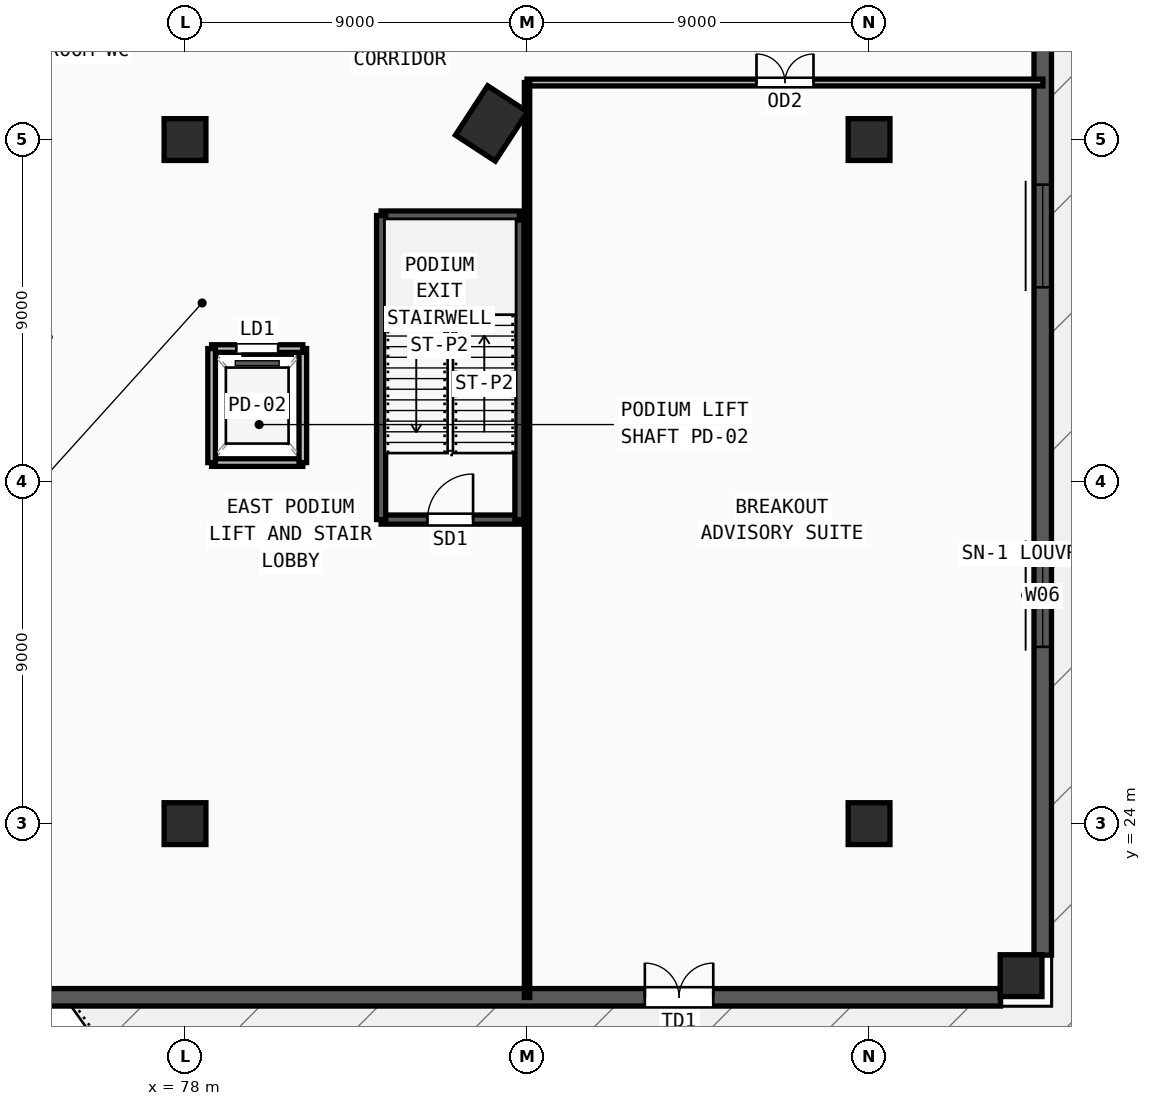
"""IFC4 building model, lengths in metres.
Left out: names, types, materials, properties, quantities, classifications, styles, units other than length and angle.
Written with IfcOpenShell. Run it as: python <this file> out.ifc"""

import sys

from ifc_helpers import new_model, si_unit, direction, frame, frame_2d, origin, origin_2d, place, context, subcontext, project, spatial, rectangle, extrude, source, transform, mapped, element, fill, save


model = new_model("IFC4")
c1 = context("Model", 3, precision=1e-05, world=origin(), true_north=direction((0.0, 1.0)))
c2 = subcontext(c1, "Body", "Model", "MODEL_VIEW")
j1 = project(units=[si_unit("LENGTHUNIT", "METRE"), si_unit("PLANEANGLEUNIT", "RADIAN")], contexts=[c1])
p1 = place(None, origin())
s1 = spatial("IfcSite", under=j1, at=p1, CompositionType="ELEMENT")
p2 = place(p1, origin())
s2 = spatial("IfcBuilding", under=s1, at=p2, CompositionType="ELEMENT")
p3 = place(p2, frame((0.0, 0.0, 9.9)))
s3 = spatial("IfcBuildingStorey", under=s2, at=p3, CompositionType="ELEMENT", Elevation=9.9)
m1 = source(origin(), c2, "Body", "SweptSolid", [
    extrude(rectangle(XDim=1.55, YDim=1.25, at=origin_2d()), origin(), (0.0, 0.0, 1.0), 4.5),
])
p4 = place(p3, frame((86.064, 42.423, 0.0), z_axis=(0.0, 0.0, 1.0), x_axis=(0.546978918409, 0.837146380758, 0.0)))
e1 = element("IfcColumn", 1, at=p4, inside=s3, PredefinedType="COLUMN", context=c2, shape_type="MappedRepresentation", body=[
    mapped(m1, transform((0.0, 0.0, 0.0), x_axis=(1.0, 0.0, 0.0), y_axis=(0.0, 1.0, 0.0), z_axis=(0.0, 0.0, 1.0), scale=1.0)),
])
m2 = source(origin(), c2, "Body", "SweptSolid", [
    extrude(rectangle(XDim=1.1, YDim=1.1, at=origin_2d()), origin(), (0.0, 0.0, 1.0), 4.5),
])
for number, where, z_axis, x_axis in (
    (2, (78.0, 24.0, 0.0), (0.0, 0.0, 1.0), (1.0, 0.0, 0.0)),
    (3, (96.0, 24.0, 0.0), (0.0, 0.0, 1.0), (1.0, 0.0, 0.0)),
    (4, (78.0, 42.0, 0.0), (0.0, 0.0, 1.0), (1.0, 0.0, 0.0)),
    (5, (96.0, 42.0, 0.0), (0.0, 0.0, 1.0), (1.0, 0.0, 0.0)),
    (6, (100.0, 20.0, 0.0), (0.0, 0.0, 1.0), (1.0, 0.0, 0.0)),
):
    element("IfcColumn", number, at=place(p3, frame(where, z_axis=z_axis, x_axis=x_axis)), inside=s3, PredefinedType="COLUMN", context=c2, shape_type="MappedRepresentation", body=[
        mapped(m2, transform((0.0, 0.0, 0.0), x_axis=(1.0, 0.0, 0.0), y_axis=(0.0, 1.0, 0.0), z_axis=(0.0, 0.0, 1.0), scale=1.0)),
    ])
p5 = place(p3, frame((100.57, 20.54, 0.0), z_axis=(0.0, 0.0, 1.0), x_axis=(0.0, 1.0, 0.0)))
e7 = element("IfcWall", 7, at=p5, inside=s3, PredefinedType="SOLIDWALL", context=c2, shape_type="SweptSolid", body=[
    extrude(rectangle(XDim=66.23, YDim=0.46, at=frame_2d((33.115, 0.0))), origin(), (0.0, 0.0, 1.0), 4.25),
])
m3 = source(origin(), c2, "Body", "SweptSolid", [
    extrude(rectangle(XDim=2.7, YDim=2.35, at=frame_2d((1.35, 1.175))), frame((0.0, 0.24, 0.0), z_axis=(0.0, -1.0, 0.0), x_axis=(1.0, 0.0, 0.0)), (0.0, 0.0, 1.0), 0.48),
])
p6 = place(p5, frame((8.111, 0.0, 0.55)))
e8 = element("IfcOpeningElement", 8, at=p6, cuts=e7, PredefinedType="OPENING", context=c2, shape_type="MappedRepresentation", body=[
    mapped(m3, transform((0.0, 0.0, 0.0), x_axis=(1.0, 0.0, 0.0), y_axis=(0.0, 1.0, 0.0), z_axis=(0.0, 0.0, 1.0), scale=1.0)),
])
p7 = place(p5, frame((17.573, 0.0, 0.55)))
e9 = element("IfcOpeningElement", 9, at=p7, cuts=e7, PredefinedType="OPENING", context=c2, shape_type="MappedRepresentation", body=[
    mapped(m3, transform((0.0, 0.0, 0.0), x_axis=(1.0, 0.0, 0.0), y_axis=(0.0, 1.0, 0.0), z_axis=(0.0, 0.0, 1.0), scale=1.0)),
])
p8 = place(p5, frame((27.034, 0.0, 0.55)))
e10 = element("IfcOpeningElement", 10, at=p8, cuts=e7, PredefinedType="OPENING", context=c2, shape_type="MappedRepresentation", body=[
    mapped(m3, transform((0.0, 0.0, 0.0), x_axis=(1.0, 0.0, 0.0), y_axis=(0.0, 1.0, 0.0), z_axis=(0.0, 0.0, 1.0), scale=1.0)),
])
p9 = place(p5, frame((36.496, 0.0, 0.55)))
e11 = element("IfcOpeningElement", 11, at=p9, cuts=e7, PredefinedType="OPENING", context=c2, shape_type="MappedRepresentation", body=[
    mapped(m3, transform((0.0, 0.0, 0.0), x_axis=(1.0, 0.0, 0.0), y_axis=(0.0, 1.0, 0.0), z_axis=(0.0, 0.0, 1.0), scale=1.0)),
])
p10 = place(p5, frame((55.419, 0.0, 0.55)))
e12 = element("IfcOpeningElement", 12, at=p10, cuts=e7, PredefinedType="OPENING", context=c2, shape_type="MappedRepresentation", body=[
    mapped(m3, transform((0.0, 0.0, 0.0), x_axis=(1.0, 0.0, 0.0), y_axis=(0.0, 1.0, 0.0), z_axis=(0.0, 0.0, 1.0), scale=1.0)),
])
p11 = place(p3, frame((20.54, 19.43, 0.0), z_axis=(0.0, 0.0, 1.0), x_axis=(1.0, 0.0, 0.0)))
e13 = element("IfcWall", 13, at=p11, inside=s3, PredefinedType="SOLIDWALL", context=c2, shape_type="SweptSolid", body=[
    extrude(rectangle(XDim=78.92, YDim=0.46, at=frame_2d((39.46, 0.0))), origin(), (0.0, 0.0, 1.0), 4.25),
])
m4 = source(origin(), c2, "Body", "SweptSolid", [
    extrude(rectangle(XDim=1.8, YDim=2.3, at=frame_2d((0.9, 1.15))), frame((0.0, 0.24, 0.0), z_axis=(0.0, -1.0, 0.0), x_axis=(1.0, 0.0, 0.0)), (0.0, 0.0, 1.0), 0.48),
])
p12 = place(p11, frame((7.56, 0.0, 0.0)))
e14 = element("IfcOpeningElement", 14, at=p12, cuts=e13, PredefinedType="OPENING", context=c2, shape_type="MappedRepresentation", body=[
    mapped(m4, transform((0.0, 0.0, 0.0), x_axis=(1.0, 0.0, 0.0), y_axis=(0.0, 1.0, 0.0), z_axis=(0.0, 0.0, 1.0), scale=1.0)),
])
p13 = place(p11, frame((69.56, 0.0, 0.0)))
e15 = element("IfcOpeningElement", 15, at=p13, cuts=e13, PredefinedType="OPENING", context=c2, shape_type="MappedRepresentation", body=[
    mapped(m4, transform((0.0, 0.0, 0.0), x_axis=(1.0, 0.0, 0.0), y_axis=(0.0, 1.0, 0.0), z_axis=(0.0, 0.0, 1.0), scale=1.0)),
])
p14 = place(p3, frame((83.16, 32.0, 0.0), z_axis=(0.0, 0.0, 1.0), x_axis=(1.0, 0.0, 0.0)))
e16 = element("IfcWall", 16, at=p14, inside=s3, PredefinedType="SOLIDWALL", context=c2, shape_type="SweptSolid", body=[
    extrude(rectangle(XDim=3.64, YDim=0.24, at=frame_2d((1.82, 0.0))), origin(), (0.0, 0.0, 1.0), 4.25),
])
m5 = source(origin(), c2, "Body", "SweptSolid", [
    extrude(rectangle(XDim=1.2, YDim=2.2, at=frame_2d((0.6, 1.1))), frame((0.0, 0.13, 0.0), z_axis=(0.0, -1.0, 0.0), x_axis=(1.0, 0.0, 0.0)), (0.0, 0.0, 1.0), 0.26),
])
p15 = place(p14, frame((1.22, 0.0, 0.0)))
e17 = element("IfcOpeningElement", 17, at=p15, cuts=e16, PredefinedType="OPENING", context=c2, shape_type="MappedRepresentation", body=[
    mapped(m5, transform((0.0, 0.0, 0.0), x_axis=(1.0, 0.0, 0.0), y_axis=(0.0, 1.0, 0.0), z_axis=(0.0, 0.0, 1.0), scale=1.0)),
])
p16 = place(p3, frame((86.8, 32.0, 0.0), z_axis=(0.0, 0.0, 1.0), x_axis=(0.0, 1.0, 0.0)))
e18 = element("IfcWall", 18, at=p16, inside=s3, PredefinedType="SOLIDWALL", context=c2, shape_type="SweptSolid", body=[
    extrude(rectangle(XDim=8.0, YDim=0.24, at=frame_2d((4.0, 0.0))), origin(), (0.0, 0.0, 1.0), 4.25),
])
p17 = place(p3, frame((86.8, 40.0, 0.0), z_axis=(0.0, 0.0, 1.0), x_axis=(-1.0, 0.0, 0.0)))
e19 = element("IfcWall", 19, at=p17, inside=s3, PredefinedType="SOLIDWALL", context=c2, shape_type="SweptSolid", body=[
    extrude(rectangle(XDim=3.64, YDim=0.24, at=frame_2d((1.82, 0.0))), origin(), (0.0, 0.0, 1.0), 4.25),
])
p18 = place(p3, frame((83.16, 40.0, 0.0), z_axis=(0.0, 0.0, 1.0), x_axis=(0.0, -1.0, 0.0)))
e20 = element("IfcWall", 20, at=p18, inside=s3, PredefinedType="SOLIDWALL", context=c2, shape_type="SweptSolid", body=[
    extrude(rectangle(XDim=8.0, YDim=0.24, at=frame_2d((4.0, 0.0))), origin(), (0.0, 0.0, 1.0), 4.25),
])
p19 = place(p3, frame((78.7, 33.5, 0.0), z_axis=(0.0, 0.0, 1.0), x_axis=(1.0, 0.0, 0.0)))
e21 = element("IfcWall", 21, at=p19, inside=s3, PredefinedType="SOLIDWALL", context=c2, shape_type="SweptSolid", body=[
    extrude(rectangle(XDim=2.4, YDim=0.2, at=frame_2d((1.2, 0.0))), origin(), (0.0, 0.0, 1.0), 4.25),
])
p20 = place(p3, frame((81.1, 33.5, 0.0), z_axis=(0.0, 0.0, 1.0), x_axis=(0.0, 1.0, 0.0)))
e22 = element("IfcWall", 22, at=p20, inside=s3, PredefinedType="SOLIDWALL", context=c2, shape_type="SweptSolid", body=[
    extrude(rectangle(XDim=3.0, YDim=0.2, at=frame_2d((1.5, 0.0))), origin(), (0.0, 0.0, 1.0), 4.25),
])
p21 = place(p3, frame((81.1, 36.5, 0.0), z_axis=(0.0, 0.0, 1.0), x_axis=(-1.0, 0.0, 0.0)))
e23 = element("IfcWall", 23, at=p21, inside=s3, PredefinedType="SOLIDWALL", context=c2, shape_type="SweptSolid", body=[
    extrude(rectangle(XDim=2.4, YDim=0.2, at=frame_2d((1.2, 0.0))), origin(), (0.0, 0.0, 1.0), 4.25),
])
m6 = source(origin(), c2, "Body", "SweptSolid", [
    extrude(rectangle(XDim=1.1, YDim=2.2, at=frame_2d((0.55, 1.1))), frame((0.0, 0.11, 0.0), z_axis=(0.0, -1.0, 0.0), x_axis=(1.0, 0.0, 0.0)), (0.0, 0.0, 1.0), 0.22),
])
p22 = place(p21, frame((0.65, 0.0, 0.0)))
e24 = element("IfcOpeningElement", 24, at=p22, cuts=e23, PredefinedType="OPENING", context=c2, shape_type="MappedRepresentation", body=[
    mapped(m6, transform((0.0, 0.0, 0.0), x_axis=(1.0, 0.0, 0.0), y_axis=(0.0, 1.0, 0.0), z_axis=(0.0, 0.0, 1.0), scale=1.0)),
])
p23 = place(p3, frame((78.7, 36.5, 0.0), z_axis=(0.0, 0.0, 1.0), x_axis=(0.0, -1.0, 0.0)))
e25 = element("IfcWall", 25, at=p23, inside=s3, PredefinedType="SOLIDWALL", context=c2, shape_type="SweptSolid", body=[
    extrude(rectangle(XDim=3.0, YDim=0.2, at=frame_2d((1.5, 0.0))), origin(), (0.0, 0.0, 1.0), 4.25),
])
p24 = place(p3, frame((87.0, 43.5, 0.0), z_axis=(0.0, 0.0, 1.0), x_axis=(1.0, 0.0, 0.0)))
e26 = element("IfcWall", 26, at=p24, inside=s3, PredefinedType="PARTITIONING", context=c2, shape_type="SweptSolid", body=[
    extrude(rectangle(XDim=13.575, YDim=0.18, at=frame_2d((6.788, 0.0))), origin(), (0.0, 0.0, 1.0), 4.25),
])
m7 = source(origin(), c2, "Body", "SweptSolid", [
    extrude(rectangle(XDim=1.5, YDim=2.2, at=frame_2d((0.75, 1.1))), frame((0.0, 0.1, 0.0), z_axis=(0.0, -1.0, 0.0), x_axis=(1.0, 0.0, 0.0)), (0.0, 0.0, 1.0), 0.2),
])
p25 = place(p24, frame((6.038, 0.0, 0.0)))
e27 = element("IfcOpeningElement", 27, at=p25, cuts=e26, PredefinedType="OPENING", context=c2, shape_type="MappedRepresentation", body=[
    mapped(m7, transform((0.0, 0.0, 0.0), x_axis=(1.0, 0.0, 0.0), y_axis=(0.0, 1.0, 0.0), z_axis=(0.0, 0.0, 1.0), scale=1.0)),
])
p26 = place(p3, frame((87.0, 19.425, 0.0), z_axis=(0.0, 0.0, 1.0), x_axis=(0.0, 1.0, 0.0)))
e28 = element("IfcWall", 28, at=p26, inside=s3, PredefinedType="PARTITIONING", context=c2, shape_type="SweptSolid", body=[
    extrude(rectangle(XDim=24.075, YDim=0.14, at=frame_2d((12.038, 0.0))), origin(), (0.0, 0.0, 1.0), 4.25),
])
m8 = source(origin(), c2, "Body", "SweptSolid", [
    extrude(rectangle(XDim=2.7, YDim=2.35, at=frame_2d((1.35, 1.175))), frame((0.0, 0.03, 0.0), z_axis=(0.0, -1.0, 0.0), x_axis=(1.0, 0.0, 0.0)), (0.0, 0.0, 1.0), 0.06),
])
p27 = place(p6, origin())
e29 = element("IfcWindow", 29, at=p27, inside=s3, PartitioningType="TRIPLE_PANEL_VERTICAL", PredefinedType="WINDOW", context=c2, shape_type="MappedRepresentation", body=[
    mapped(m8, transform((0.0, 0.0, 0.0), x_axis=(1.0, 0.0, 0.0), y_axis=(0.0, 1.0, 0.0), z_axis=(0.0, 0.0, 1.0), scale=1.0)),
])
fill(e8, e29)
p28 = place(p7, origin())
e30 = element("IfcWindow", 30, at=p28, inside=s3, PartitioningType="TRIPLE_PANEL_VERTICAL", PredefinedType="WINDOW", context=c2, shape_type="MappedRepresentation", body=[
    mapped(m8, transform((0.0, 0.0, 0.0), x_axis=(1.0, 0.0, 0.0), y_axis=(0.0, 1.0, 0.0), z_axis=(0.0, 0.0, 1.0), scale=1.0)),
])
fill(e9, e30)
m9 = source(origin(), c2, "Body", "SweptSolid", [
    extrude(rectangle(XDim=1.8, YDim=2.3, at=frame_2d((0.9, 1.15))), frame((0.0, 0.025, 0.0), z_axis=(0.0, -1.0, 0.0), x_axis=(1.0, 0.0, 0.0)), (0.0, 0.0, 1.0), 0.05),
])
p29 = place(p13, origin())
e31 = element("IfcDoor", 31, at=p29, inside=s3, OperationType="DOUBLE_DOOR_SINGLE_SWING", PredefinedType="DOOR", context=c2, shape_type="MappedRepresentation", body=[
    mapped(m9, transform((0.0, 0.0, 0.0), x_axis=(1.0, 0.0, 0.0), y_axis=(0.0, 1.0, 0.0), z_axis=(0.0, 0.0, 1.0), scale=1.0)),
])
fill(e15, e31)
m10 = source(origin(), c2, "Body", "SweptSolid", [
    extrude(rectangle(XDim=1.2, YDim=2.2, at=frame_2d((0.6, 1.1))), frame((0.0, 0.025, 0.0), z_axis=(0.0, -1.0, 0.0), x_axis=(1.0, 0.0, 0.0)), (0.0, 0.0, 1.0), 0.05),
])
p30 = place(p15, origin())
e32 = element("IfcDoor", 32, at=p30, inside=s3, OperationType="SINGLE_SWING_RIGHT", PredefinedType="DOOR", context=c2, shape_type="MappedRepresentation", body=[
    mapped(m10, transform((0.0, 0.0, 0.0), x_axis=(1.0, 0.0, 0.0), y_axis=(0.0, 1.0, 0.0), z_axis=(0.0, 0.0, 1.0), scale=1.0)),
])
fill(e17, e32)
m11 = source(origin(), c2, "Body", "SweptSolid", [
    extrude(rectangle(XDim=1.1, YDim=2.2, at=frame_2d((0.55, 1.1))), frame((0.0, 0.025, 0.0), z_axis=(0.0, -1.0, 0.0), x_axis=(1.0, 0.0, 0.0)), (0.0, 0.0, 1.0), 0.05),
])
p31 = place(p22, origin())
e33 = element("IfcDoor", 33, at=p31, inside=s3, OperationType="SLIDING_TO_LEFT", PredefinedType="DOOR", context=c2, shape_type="MappedRepresentation", body=[
    mapped(m11, transform((0.0, 0.0, 0.0), x_axis=(1.0, 0.0, 0.0), y_axis=(0.0, 1.0, 0.0), z_axis=(0.0, 0.0, 1.0), scale=1.0)),
])
fill(e24, e33)
m12 = source(origin(), c2, "Body", "SweptSolid", [
    extrude(rectangle(XDim=1.5, YDim=2.2, at=frame_2d((0.75, 1.1))), frame((0.0, 0.025, 0.0), z_axis=(0.0, -1.0, 0.0), x_axis=(1.0, 0.0, 0.0)), (0.0, 0.0, 1.0), 0.05),
])
p32 = place(p25, origin())
e34 = element("IfcDoor", 34, at=p32, inside=s3, OperationType="DOUBLE_DOOR_SINGLE_SWING", PredefinedType="DOOR", context=c2, shape_type="MappedRepresentation", body=[
    mapped(m12, transform((0.0, 0.0, 0.0), x_axis=(1.0, 0.0, 0.0), y_axis=(0.0, 1.0, 0.0), z_axis=(0.0, 0.0, 1.0), scale=1.0)),
])
fill(e27, e34)
save(model, sys.argv[1])
